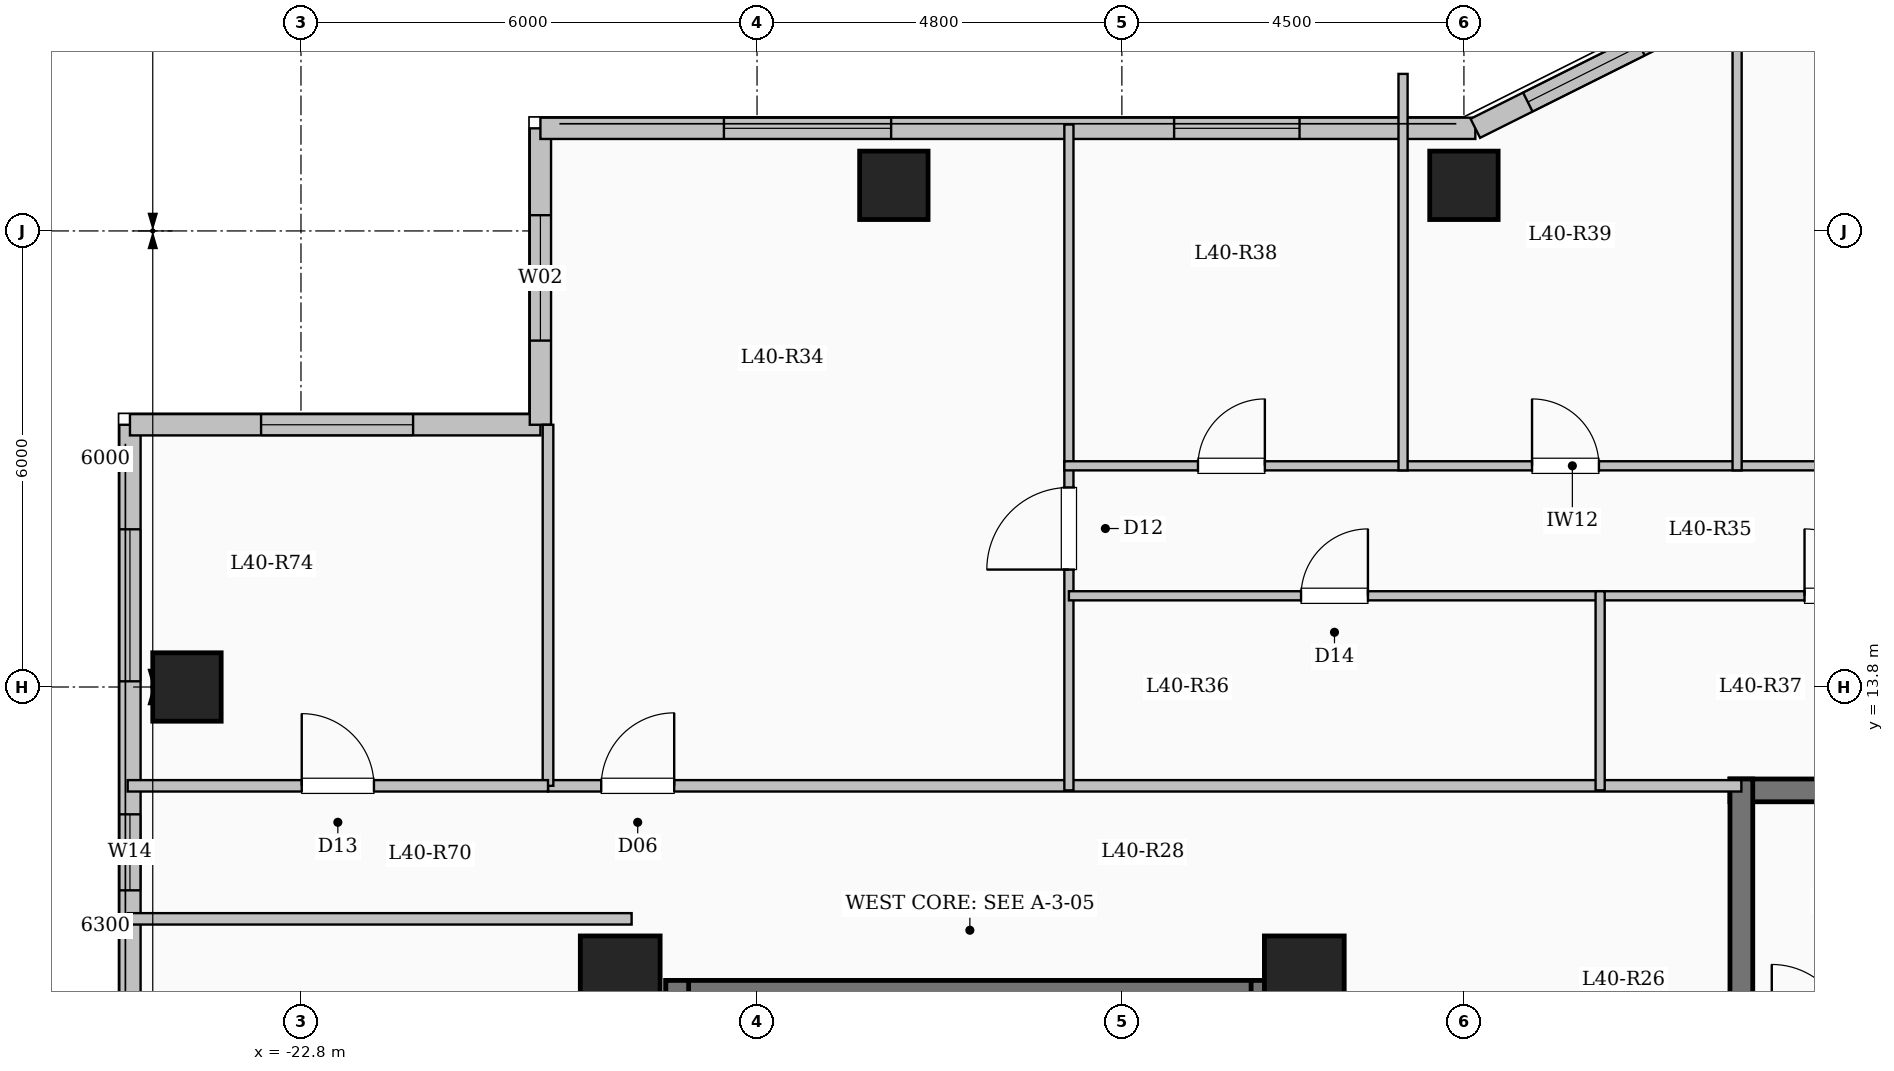
"""IFC4 building model, lengths in metres.
Left out: names, types, materials, properties, quantities, classifications, styles, units other than length and angle.
Written with IfcOpenShell. Run it as: python <this file> out.ifc"""

import sys

from ifc_helpers import new_model, si_unit, direction, frame, frame_2d, origin, origin_2d, place, context, subcontext, project, spatial, rectangle, extrude, element, fill, save


model = new_model("IFC4")
c1 = context("Model", 3, precision=1e-05, world=origin(), true_north=direction((0.0, 1.0)))
c2 = subcontext(c1, "Body", "Model", "MODEL_VIEW")
j1 = project(units=[si_unit("LENGTHUNIT", "METRE"), si_unit("PLANEANGLEUNIT", "RADIAN")], contexts=[c1])
p1 = place(None, origin())
s1 = spatial("IfcSite", under=j1, at=p1, CompositionType="ELEMENT")
p2 = place(p1, origin())
s2 = spatial("IfcBuilding", under=s1, at=p2, CompositionType="ELEMENT")
p3 = place(p2, frame((0.0, 0.0, 149.35)))
s3 = spatial("IfcBuildingStorey", under=s2, at=p3, CompositionType="ELEMENT", Elevation=149.35)
for number, where, z_axis, x_axis in (
    (1, (-9.6, 10.0, 0.0), (0.0, 0.0, 1.0), (1.0, 0.0, 0.0)),
    (2, (-18.6, 10.0, 0.0), (0.0, 0.0, 1.0), (1.0, 0.0, 0.0)),
):
    element("IfcColumn", number, at=place(p3, frame(where, z_axis=z_axis, x_axis=x_axis)), inside=s3, PredefinedType="COLUMN", context=c2, shape_type="SweptSolid", body=[
        extrude(rectangle(XDim=1.05, YDim=1.05, at=origin_2d()), origin(), (0.0, 0.0, 1.0), 3.35),
    ])
for number, where, z_axis, x_axis in (
    (3, (-15.0, 20.4, 0.0), (0.0, 0.0, 1.0), (1.0, 0.0, 0.0)),
    (4, (-7.5, 20.4, 0.0), (0.0, 0.0, 1.0), (1.0, 0.0, 0.0)),
    (5, (-24.3, 13.8, 0.0), (0.0, 0.0, 1.0), (1.0, 0.0, 0.0)),
):
    element("IfcColumn", number, at=place(p3, frame(where, z_axis=z_axis, x_axis=x_axis)), inside=s3, PredefinedType="COLUMN", context=c2, shape_type="SweptSolid", body=[
        extrude(rectangle(XDim=0.9, YDim=0.9, at=origin_2d()), origin(), (0.0, 0.0, 1.0), 3.35),
    ])
p4 = place(p3, frame((-25.05, -17.25, 0.0), z_axis=(0.0, 0.0, 1.0), x_axis=(0.0, 1.0, 0.0)))
e6 = element("IfcWall", 6, at=p4, inside=s3, PredefinedType="SOLIDWALL", context=c2, shape_type="SweptSolid", body=[
    extrude(rectangle(XDim=34.5, YDim=0.28, at=frame_2d((17.25, 0.0))), origin(), (0.0, 0.0, 1.0), 3.1),
])
p5 = place(p4, frame((2.35, 0.0, 0.9)))
e7 = element("IfcOpeningElement", 7, at=p5, cuts=e6, PredefinedType="OPENING", context=c2, shape_type="SweptSolid", body=[
    extrude(rectangle(XDim=2.2, YDim=1.75, at=frame_2d((1.1, 0.875))), frame((0.0, 0.15, 0.0), z_axis=(0.0, -1.0, 0.0), x_axis=(1.0, 0.0, 0.0)), (0.0, 0.0, 1.0), 0.3),
])
p6 = place(p4, frame((7.742, 0.0, 0.9)))
e8 = element("IfcOpeningElement", 8, at=p6, cuts=e6, PredefinedType="OPENING", context=c2, shape_type="SweptSolid", body=[
    extrude(rectangle(XDim=1.5, YDim=1.65, at=frame_2d((0.75, 0.825))), frame((0.0, 0.15, 0.0), z_axis=(0.0, -1.0, 0.0), x_axis=(1.0, 0.0, 0.0)), (0.0, 0.0, 1.0), 0.3),
])
p7 = place(p4, frame((18.0, 0.0, 0.9)))
e9 = element("IfcOpeningElement", 9, at=p7, cuts=e6, PredefinedType="OPENING", context=c2, shape_type="SweptSolid", body=[
    extrude(rectangle(XDim=2.0, YDim=1.7, at=frame_2d((1.0, 0.85))), frame((0.0, 0.15, 0.0), z_axis=(0.0, -1.0, 0.0), x_axis=(1.0, 0.0, 0.0)), (0.0, 0.0, 1.0), 0.3),
])
p8 = place(p4, frame((28.375, 0.0, 0.95)))
e10 = element("IfcOpeningElement", 10, at=p8, cuts=e6, PredefinedType="OPENING", context=c2, shape_type="SweptSolid", body=[
    extrude(rectangle(XDim=1.0, YDim=1.5, at=frame_2d((0.5, 0.75))), frame((0.0, 0.15, 0.0), z_axis=(0.0, -1.0, 0.0), x_axis=(1.0, 0.0, 0.0)), (0.0, 0.0, 1.0), 0.3),
])
p9 = place(p4, frame((31.125, 0.0, 0.9)))
e11 = element("IfcOpeningElement", 11, at=p9, cuts=e6, PredefinedType="OPENING", context=c2, shape_type="SweptSolid", body=[
    extrude(rectangle(XDim=2.0, YDim=1.7, at=frame_2d((1.0, 0.85))), frame((0.0, 0.15, 0.0), z_axis=(0.0, -1.0, 0.0), x_axis=(1.0, 0.0, 0.0)), (0.0, 0.0, 1.0), 0.3),
])
p10 = place(p3, frame((-25.05, 17.25, 0.0), z_axis=(0.0, 0.0, 1.0), x_axis=(1.0, 0.0, 0.0)))
e12 = element("IfcWall", 12, at=p10, inside=s3, PredefinedType="SOLIDWALL", context=c2, shape_type="SweptSolid", body=[
    extrude(rectangle(XDim=5.4, YDim=0.28, at=frame_2d((2.7, 0.0))), origin(), (0.0, 0.0, 1.0), 3.1),
])
p11 = place(p10, frame((1.725, 0.0, 0.9)))
e13 = element("IfcOpeningElement", 13, at=p11, cuts=e12, PredefinedType="OPENING", context=c2, shape_type="SweptSolid", body=[
    extrude(rectangle(XDim=2.0, YDim=1.7, at=frame_2d((1.0, 0.85))), frame((0.0, 0.15, 0.0), z_axis=(0.0, -1.0, 0.0), x_axis=(1.0, 0.0, 0.0)), (0.0, 0.0, 1.0), 0.3),
])
p12 = place(p3, frame((-19.65, 17.25, 0.0), z_axis=(0.0, 0.0, 1.0), x_axis=(0.0, 1.0, 0.0)))
e14 = element("IfcWall", 14, at=p12, inside=s3, PredefinedType="SOLIDWALL", context=c2, shape_type="SweptSolid", body=[
    extrude(rectangle(XDim=3.9, YDim=0.28, at=frame_2d((1.95, 0.0))), origin(), (0.0, 0.0, 1.0), 3.1),
])
p13 = place(p12, frame((1.107, 0.0, 0.9)))
e15 = element("IfcOpeningElement", 15, at=p13, cuts=e14, PredefinedType="OPENING", context=c2, shape_type="SweptSolid", body=[
    extrude(rectangle(XDim=1.65, YDim=1.6, at=frame_2d((0.825, 0.8))), frame((0.0, 0.15, 0.0), z_axis=(0.0, -1.0, 0.0), x_axis=(1.0, 0.0, 0.0)), (0.0, 0.0, 1.0), 0.3),
])
p14 = place(p3, frame((-19.65, 21.15, 0.0), z_axis=(0.0, 0.0, 1.0), x_axis=(1.0, 0.0, 0.0)))
e16 = element("IfcWall", 16, at=p14, inside=s3, PredefinedType="SOLIDWALL", context=c2, shape_type="SweptSolid", body=[
    extrude(rectangle(XDim=12.3, YDim=0.28, at=frame_2d((6.15, 0.0))), origin(), (0.0, 0.0, 1.0), 3.1),
])
p15 = place(p14, frame((2.414, 0.0, 0.9)))
e17 = element("IfcOpeningElement", 17, at=p15, cuts=e16, PredefinedType="OPENING", context=c2, shape_type="SweptSolid", body=[
    extrude(rectangle(XDim=2.2, YDim=1.75, at=frame_2d((1.1, 0.875))), frame((0.0, 0.15, 0.0), z_axis=(0.0, -1.0, 0.0), x_axis=(1.0, 0.0, 0.0)), (0.0, 0.0, 1.0), 0.3),
])
p16 = place(p14, frame((8.337, 0.0, 0.9)))
e18 = element("IfcOpeningElement", 18, at=p16, cuts=e16, PredefinedType="OPENING", context=c2, shape_type="SweptSolid", body=[
    extrude(rectangle(XDim=1.65, YDim=1.6, at=frame_2d((0.825, 0.8))), frame((0.0, 0.15, 0.0), z_axis=(0.0, -1.0, 0.0), x_axis=(1.0, 0.0, 0.0)), (0.0, 0.0, 1.0), 0.3),
])
p17 = place(p3, frame((-7.35, 21.15, 0.0), z_axis=(0.0, 0.0, 1.0), x_axis=(0.894427191, 0.4472135955, 0.0)))
e19 = element("IfcWall", 19, at=p17, inside=s3, PredefinedType="SOLIDWALL", context=c2, shape_type="SweptSolid", body=[
    extrude(rectangle(XDim=3.354, YDim=0.28, at=frame_2d((1.677, 0.0))), origin(), (0.0, 0.0, 1.0), 3.1),
])
p18 = place(p17, frame((0.772, 0.0, 0.9)))
e20 = element("IfcOpeningElement", 20, at=p18, cuts=e19, PredefinedType="OPENING", context=c2, shape_type="SweptSolid", body=[
    extrude(rectangle(XDim=1.65, YDim=1.6, at=frame_2d((0.825, 0.8))), frame((0.0, 0.15, 0.0), z_axis=(0.0, -1.0, 0.0), x_axis=(1.0, 0.0, 0.0)), (0.0, 0.0, 1.0), 0.3),
])
p19 = place(p3, frame((-18.0, 9.79, 0.0), z_axis=(0.0, 0.0, 1.0), x_axis=(1.0, 0.0, 0.0)))
e21 = element("IfcWall", 21, at=p19, inside=s3, PredefinedType="SHEAR", context=c2, shape_type="SweptSolid", body=[
    extrude(rectangle(XDim=8.0, YDim=0.3, at=frame_2d((4.0, 0.0))), origin(), (0.0, 0.0, 1.0), 3.35),
])
for number, where, z_axis, x_axis in (
    (22, (-17.85, 6.35, 0.0), (0.0, 0.0, 1.0), (0.0, 1.0, 0.0)),
    (23, (-10.15, 6.35, 0.0), (0.0, 0.0, 1.0), (0.0, 1.0, 0.0)),
):
    element("IfcWall", number, at=place(p3, frame(where, z_axis=z_axis, x_axis=x_axis)), inside=s3, PredefinedType="SHEAR", context=c2, shape_type="SweptSolid", body=[
        extrude(rectangle(XDim=3.59, YDim=0.3, at=frame_2d((1.795, 0.0))), origin(), (0.0, 0.0, 1.0), 3.35),
    ])
p20 = place(p3, frame((-4.0, 12.44, 0.0), z_axis=(0.0, 0.0, 1.0), x_axis=(1.0, 0.0, 0.0)))
e24 = element("IfcWall", 24, at=p20, inside=s3, PredefinedType="SHEAR", context=c2, shape_type="SweptSolid", body=[
    extrude(rectangle(XDim=8.0, YDim=0.3, at=frame_2d((4.0, 0.0))), origin(), (0.0, 0.0, 1.0), 3.35),
])
p21 = place(p3, frame((-3.85, 9.0, 0.0), z_axis=(0.0, 0.0, 1.0), x_axis=(0.0, 1.0, 0.0)))
e25 = element("IfcWall", 25, at=p21, inside=s3, PredefinedType="SHEAR", context=c2, shape_type="SweptSolid", body=[
    extrude(rectangle(XDim=3.59, YDim=0.3, at=frame_2d((1.795, 0.0))), origin(), (0.0, 0.0, 1.0), 3.35),
])
p22 = place(p3, frame((-19.55, 12.5, 0.0), z_axis=(0.0, 0.0, 1.0), x_axis=(1.0, 0.0, 0.0)))
e26 = element("IfcWall", 26, at=p22, inside=s3, PredefinedType="PARTITIONING", context=c2, shape_type="SweptSolid", body=[
    extrude(rectangle(XDim=15.7, YDim=0.15, at=frame_2d((7.85, 0.0))), origin(), (0.0, 0.0, 1.0), 3.1),
])
p23 = place(p22, frame((0.7, 0.0, 0.0)))
e27 = element("IfcOpeningElement", 27, at=p23, cuts=e26, PredefinedType="OPENING", context=c2, shape_type="SweptSolid", body=[
    extrude(rectangle(XDim=0.96, YDim=2.15, at=frame_2d((0.48, 1.075))), frame((0.0, 0.085, 0.0), z_axis=(0.0, -1.0, 0.0), x_axis=(1.0, 0.0, 0.0)), (0.0, 0.0, 1.0), 0.17),
])
p24 = place(p3, frame((-12.697, 12.44, 0.0), z_axis=(0.0, 0.0, 1.0), x_axis=(0.0, 1.0, 0.0)))
e28 = element("IfcWall", 28, at=p24, inside=s3, PredefinedType="PARTITIONING", context=c2, shape_type="SweptSolid", body=[
    extrude(rectangle(XDim=8.76, YDim=0.12, at=frame_2d((4.38, 0.0))), origin(), (0.0, 0.0, 1.0), 3.1),
])
p25 = place(p24, frame((2.905, 0.0, 0.0)))
e29 = element("IfcOpeningElement", 29, at=p25, cuts=e28, PredefinedType="OPENING", context=c2, shape_type="SweptSolid", body=[
    extrude(rectangle(XDim=1.08, YDim=2.15, at=frame_2d((0.54, 1.075))), frame((0.0, 0.07, 0.0), z_axis=(0.0, -1.0, 0.0), x_axis=(1.0, 0.0, 0.0)), (0.0, 0.0, 1.0), 0.14),
])
p26 = place(p3, frame((-12.697, 15.0, 0.0), z_axis=(0.0, 0.0, 1.0), x_axis=(1.0, 0.0, 0.0)))
e30 = element("IfcWall", 30, at=p26, inside=s3, PredefinedType="PARTITIONING", context=c2, shape_type="SweptSolid", body=[
    extrude(rectangle(XDim=6.989, YDim=0.12, at=frame_2d((3.495, 0.0))), origin(), (0.0, 0.0, 1.0), 3.1),
])
p27 = place(p26, frame((3.054, 0.0, 0.0)))
e31 = element("IfcOpeningElement", 31, at=p27, cuts=e30, PredefinedType="OPENING", context=c2, shape_type="SweptSolid", body=[
    extrude(rectangle(XDim=0.88, YDim=2.1, at=frame_2d((0.44, 1.05))), frame((0.0, 0.07, 0.0), z_axis=(0.0, -1.0, 0.0), x_axis=(1.0, 0.0, 0.0)), (0.0, 0.0, 1.0), 0.14),
])
p28 = place(p3, frame((-5.708, 15.0, 0.0), z_axis=(0.0, 0.0, 1.0), x_axis=(1.0, 0.0, 0.0)))
e32 = element("IfcWall", 32, at=p28, inside=s3, PredefinedType="PARTITIONING", context=c2, shape_type="SweptSolid", body=[
    extrude(rectangle(XDim=6.258, YDim=0.12, at=frame_2d((3.129, 0.0))), origin(), (0.0, 0.0, 1.0), 3.1),
])
p29 = place(p28, frame((2.689, 0.0, 0.0)))
e33 = element("IfcOpeningElement", 33, at=p29, cuts=e32, PredefinedType="OPENING", context=c2, shape_type="SweptSolid", body=[
    extrude(rectangle(XDim=0.88, YDim=2.1, at=frame_2d((0.44, 1.05))), frame((0.0, 0.07, 0.0), z_axis=(0.0, -1.0, 0.0), x_axis=(1.0, 0.0, 0.0)), (0.0, 0.0, 1.0), 0.14),
])
p30 = place(p3, frame((-12.757, 16.71, 0.0), z_axis=(0.0, 0.0, 1.0), x_axis=(1.0, 0.0, 0.0)))
e34 = element("IfcWall", 34, at=p30, inside=s3, PredefinedType="PARTITIONING", context=c2, shape_type="SweptSolid", body=[
    extrude(rectangle(XDim=13.367, YDim=0.12, at=frame_2d((6.684, 0.0))), origin(), (0.0, 0.0, 1.0), 3.1),
])
p31 = place(p30, frame((1.758, 0.0, 0.0)))
e35 = element("IfcOpeningElement", 35, at=p31, cuts=e34, PredefinedType="OPENING", context=c2, shape_type="SweptSolid", body=[
    extrude(rectangle(XDim=0.88, YDim=2.1, at=frame_2d((0.44, 1.05))), frame((0.0, 0.07, 0.0), z_axis=(0.0, -1.0, 0.0), x_axis=(1.0, 0.0, 0.0)), (0.0, 0.0, 1.0), 0.14),
])
p32 = place(p30, frame((6.153, 0.0, 0.0)))
e36 = element("IfcOpeningElement", 36, at=p32, cuts=e34, PredefinedType="OPENING", context=c2, shape_type="SweptSolid", body=[
    extrude(rectangle(XDim=0.88, YDim=2.1, at=frame_2d((0.44, 1.05))), frame((0.0, 0.07, 0.0), z_axis=(0.0, -1.0, 0.0), x_axis=(1.0, 0.0, 0.0)), (0.0, 0.0, 1.0), 0.14),
])
p33 = place(p30, frame((10.549, 0.0, 0.0)))
e37 = element("IfcOpeningElement", 37, at=p33, cuts=e34, PredefinedType="OPENING", context=c2, shape_type="SweptSolid", body=[
    extrude(rectangle(XDim=0.88, YDim=2.1, at=frame_2d((0.44, 1.05))), frame((0.0, 0.07, 0.0), z_axis=(0.0, -1.0, 0.0), x_axis=(1.0, 0.0, 0.0)), (0.0, 0.0, 1.0), 0.14),
])
p34 = place(p3, frame((-5.708, 12.44, 0.0), z_axis=(0.0, 0.0, 1.0), x_axis=(0.0, 1.0, 0.0)))
e38 = element("IfcWall", 38, at=p34, inside=s3, PredefinedType="PARTITIONING", context=c2, shape_type="SweptSolid", body=[
    extrude(rectangle(XDim=2.62, YDim=0.12, at=frame_2d((1.31, 0.0))), origin(), (0.0, 0.0, 1.0), 3.1),
])
p35 = place(p3, frame((-8.301, 16.65, 0.0), z_axis=(0.0, 0.0, 1.0), x_axis=(0.0, 1.0, 0.0)))
e39 = element("IfcWall", 39, at=p35, inside=s3, PredefinedType="PARTITIONING", context=c2, shape_type="SweptSolid", body=[
    extrude(rectangle(XDim=5.216, YDim=0.12, at=frame_2d((2.608, 0.0))), origin(), (0.0, 0.0, 1.0), 3.1),
])
p36 = place(p3, frame((-3.906, 16.65, 0.0), z_axis=(0.0, 0.0, 1.0), x_axis=(0.0, 1.0, 0.0)))
e40 = element("IfcWall", 40, at=p36, inside=s3, PredefinedType="PARTITIONING", context=c2, shape_type="SweptSolid", body=[
    extrude(rectangle(XDim=6.03, YDim=0.12, at=frame_2d((3.015, 0.0))), origin(), (0.0, 0.0, 1.0), 3.1),
])
p37 = place(p3, frame((-25.08, 10.75, 0.0), z_axis=(0.0, 0.0, 1.0), x_axis=(1.0, 0.0, 0.0)))
e41 = element("IfcWall", 41, at=p37, inside=s3, PredefinedType="PARTITIONING", context=c2, shape_type="SweptSolid", body=[
    extrude(rectangle(XDim=6.63, YDim=0.15, at=frame_2d((3.315, 0.0))), origin(), (0.0, 0.0, 1.0), 3.1),
])
p38 = place(p3, frame((-19.55, 12.5, 0.0), z_axis=(0.0, 0.0, 1.0), x_axis=(0.0, 1.0, 0.0)))
e42 = element("IfcWall", 42, at=p38, inside=s3, PredefinedType="PARTITIONING", context=c2, shape_type="SweptSolid", body=[
    extrude(rectangle(XDim=4.75, YDim=0.14, at=frame_2d((2.375, 0.0))), origin(), (0.0, 0.0, 1.0), 3.1),
])
p39 = place(p3, frame((-25.08, 12.5, 0.0), z_axis=(0.0, 0.0, 1.0), x_axis=(1.0, 0.0, 0.0)))
e43 = element("IfcWall", 43, at=p39, inside=s3, PredefinedType="PARTITIONING", context=c2, shape_type="SweptSolid", body=[
    extrude(rectangle(XDim=5.53, YDim=0.15, at=frame_2d((2.765, 0.0))), origin(), (0.0, 0.0, 1.0), 3.1),
])
p40 = place(p39, frame((2.29, 0.0, 0.0)))
e44 = element("IfcOpeningElement", 44, at=p40, cuts=e43, PredefinedType="OPENING", context=c2, shape_type="SweptSolid", body=[
    extrude(rectangle(XDim=0.95, YDim=2.15, at=frame_2d((0.475, 1.075))), frame((0.0, 0.085, 0.0), z_axis=(0.0, -1.0, 0.0), x_axis=(1.0, 0.0, 0.0)), (0.0, 0.0, 1.0), 0.17),
])
p41 = place(p8, origin())
e45 = element("IfcWindow", 45, at=p41, inside=s3, PartitioningType="SINGLE_PANEL", PredefinedType="WINDOW", context=c2, shape_type="SweptSolid", body=[
    extrude(rectangle(XDim=1.0, YDim=1.5, at=frame_2d((0.5, 0.75))), frame((0.0, 0.03, 0.0), z_axis=(0.0, -1.0, 0.0), x_axis=(1.0, 0.0, 0.0)), (0.0, 0.0, 1.0), 0.06),
])
fill(e10, e45)
p42 = place(p9, origin())
e46 = element("IfcWindow", 46, at=p42, inside=s3, PartitioningType="SINGLE_PANEL", PredefinedType="WINDOW", context=c2, shape_type="SweptSolid", body=[
    extrude(rectangle(XDim=2.0, YDim=1.7, at=frame_2d((1.0, 0.85))), frame((0.0, 0.03, 0.0), z_axis=(0.0, -1.0, 0.0), x_axis=(1.0, 0.0, 0.0)), (0.0, 0.0, 1.0), 0.06),
])
fill(e11, e46)
p43 = place(p11, origin())
e47 = element("IfcWindow", 47, at=p43, inside=s3, PartitioningType="SINGLE_PANEL", PredefinedType="WINDOW", context=c2, shape_type="SweptSolid", body=[
    extrude(rectangle(XDim=2.0, YDim=1.7, at=frame_2d((1.0, 0.85))), frame((0.0, 0.03, 0.0), z_axis=(0.0, -1.0, 0.0), x_axis=(1.0, 0.0, 0.0)), (0.0, 0.0, 1.0), 0.06),
])
fill(e13, e47)
p44 = place(p13, origin())
e48 = element("IfcWindow", 48, at=p44, inside=s3, PartitioningType="SINGLE_PANEL", PredefinedType="WINDOW", context=c2, shape_type="SweptSolid", body=[
    extrude(rectangle(XDim=1.65, YDim=1.6, at=frame_2d((0.825, 0.8))), frame((0.0, 0.03, 0.0), z_axis=(0.0, -1.0, 0.0), x_axis=(1.0, 0.0, 0.0)), (0.0, 0.0, 1.0), 0.06),
])
fill(e15, e48)
p45 = place(p15, origin())
e49 = element("IfcWindow", 49, at=p45, inside=s3, PartitioningType="SINGLE_PANEL", PredefinedType="WINDOW", context=c2, shape_type="SweptSolid", body=[
    extrude(rectangle(XDim=2.2, YDim=1.75, at=frame_2d((1.1, 0.875))), frame((0.0, 0.03, 0.0), z_axis=(0.0, -1.0, 0.0), x_axis=(1.0, 0.0, 0.0)), (0.0, 0.0, 1.0), 0.06),
])
fill(e17, e49)
p46 = place(p16, origin())
e50 = element("IfcWindow", 50, at=p46, inside=s3, PartitioningType="SINGLE_PANEL", PredefinedType="WINDOW", context=c2, shape_type="SweptSolid", body=[
    extrude(rectangle(XDim=1.65, YDim=1.6, at=frame_2d((0.825, 0.8))), frame((0.0, 0.03, 0.0), z_axis=(0.0, -1.0, 0.0), x_axis=(1.0, 0.0, 0.0)), (0.0, 0.0, 1.0), 0.06),
])
fill(e18, e50)
p47 = place(p18, origin())
e51 = element("IfcWindow", 51, at=p47, inside=s3, PartitioningType="SINGLE_PANEL", PredefinedType="WINDOW", context=c2, shape_type="SweptSolid", body=[
    extrude(rectangle(XDim=1.65, YDim=1.6, at=frame_2d((0.825, 0.8))), frame((0.0, 0.03, 0.0), z_axis=(0.0, -1.0, 0.0), x_axis=(1.0, 0.0, 0.0)), (0.0, 0.0, 1.0), 0.06),
])
fill(e20, e51)
p48 = place(p23, origin())
e52 = element("IfcDoor", 52, at=p48, inside=s3, OperationType="SINGLE_SWING_RIGHT", PredefinedType="DOOR", context=c2, shape_type="SweptSolid", body=[
    extrude(rectangle(XDim=0.96, YDim=2.15, at=frame_2d((0.48, 1.075))), frame((0.0, 0.025, 0.0), z_axis=(0.0, -1.0, 0.0), x_axis=(1.0, 0.0, 0.0)), (0.0, 0.0, 1.0), 0.05),
])
fill(e27, e52)
p49 = place(p25, origin())
e53 = element("IfcDoor", 53, at=p49, inside=s3, OperationType="SINGLE_SWING_LEFT", PredefinedType="DOOR", context=c2, shape_type="SweptSolid", body=[
    extrude(rectangle(XDim=1.08, YDim=2.15, at=frame_2d((0.54, 1.075))), frame((0.0, 0.025, 0.0), z_axis=(0.0, -1.0, 0.0), x_axis=(1.0, 0.0, 0.0)), (0.0, 0.0, 1.0), 0.05),
])
fill(e29, e53)
p50 = place(p27, origin())
e54 = element("IfcDoor", 54, at=p50, inside=s3, OperationType="SINGLE_SWING_RIGHT", PredefinedType="DOOR", context=c2, shape_type="SweptSolid", body=[
    extrude(rectangle(XDim=0.88, YDim=2.1, at=frame_2d((0.44, 1.05))), frame((0.0, 0.025, 0.0), z_axis=(0.0, -1.0, 0.0), x_axis=(1.0, 0.0, 0.0)), (0.0, 0.0, 1.0), 0.05),
])
fill(e31, e54)
p51 = place(p29, origin())
e55 = element("IfcDoor", 55, at=p51, inside=s3, OperationType="SINGLE_SWING_LEFT", PredefinedType="DOOR", context=c2, shape_type="SweptSolid", body=[
    extrude(rectangle(XDim=0.88, YDim=2.1, at=frame_2d((0.44, 1.05))), frame((0.0, 0.025, 0.0), z_axis=(0.0, -1.0, 0.0), x_axis=(1.0, 0.0, 0.0)), (0.0, 0.0, 1.0), 0.05),
])
fill(e33, e55)
p52 = place(p31, origin())
e56 = element("IfcDoor", 56, at=p52, inside=s3, OperationType="SINGLE_SWING_RIGHT", PredefinedType="DOOR", context=c2, shape_type="SweptSolid", body=[
    extrude(rectangle(XDim=0.88, YDim=2.1, at=frame_2d((0.44, 1.05))), frame((0.0, 0.025, 0.0), z_axis=(0.0, -1.0, 0.0), x_axis=(1.0, 0.0, 0.0)), (0.0, 0.0, 1.0), 0.05),
])
fill(e35, e56)
p53 = place(p32, origin())
e57 = element("IfcDoor", 57, at=p53, inside=s3, OperationType="SINGLE_SWING_LEFT", PredefinedType="DOOR", context=c2, shape_type="SweptSolid", body=[
    extrude(rectangle(XDim=0.88, YDim=2.1, at=frame_2d((0.44, 1.05))), frame((0.0, 0.025, 0.0), z_axis=(0.0, -1.0, 0.0), x_axis=(1.0, 0.0, 0.0)), (0.0, 0.0, 1.0), 0.05),
])
fill(e36, e57)
p54 = place(p40, origin())
e58 = element("IfcDoor", 58, at=p54, inside=s3, OperationType="SINGLE_SWING_LEFT", PredefinedType="DOOR", context=c2, shape_type="SweptSolid", body=[
    extrude(rectangle(XDim=0.95, YDim=2.15, at=frame_2d((0.475, 1.075))), frame((0.0, 0.025, 0.0), z_axis=(0.0, -1.0, 0.0), x_axis=(1.0, 0.0, 0.0)), (0.0, 0.0, 1.0), 0.05),
])
fill(e44, e58)
save(model, sys.argv[1])
